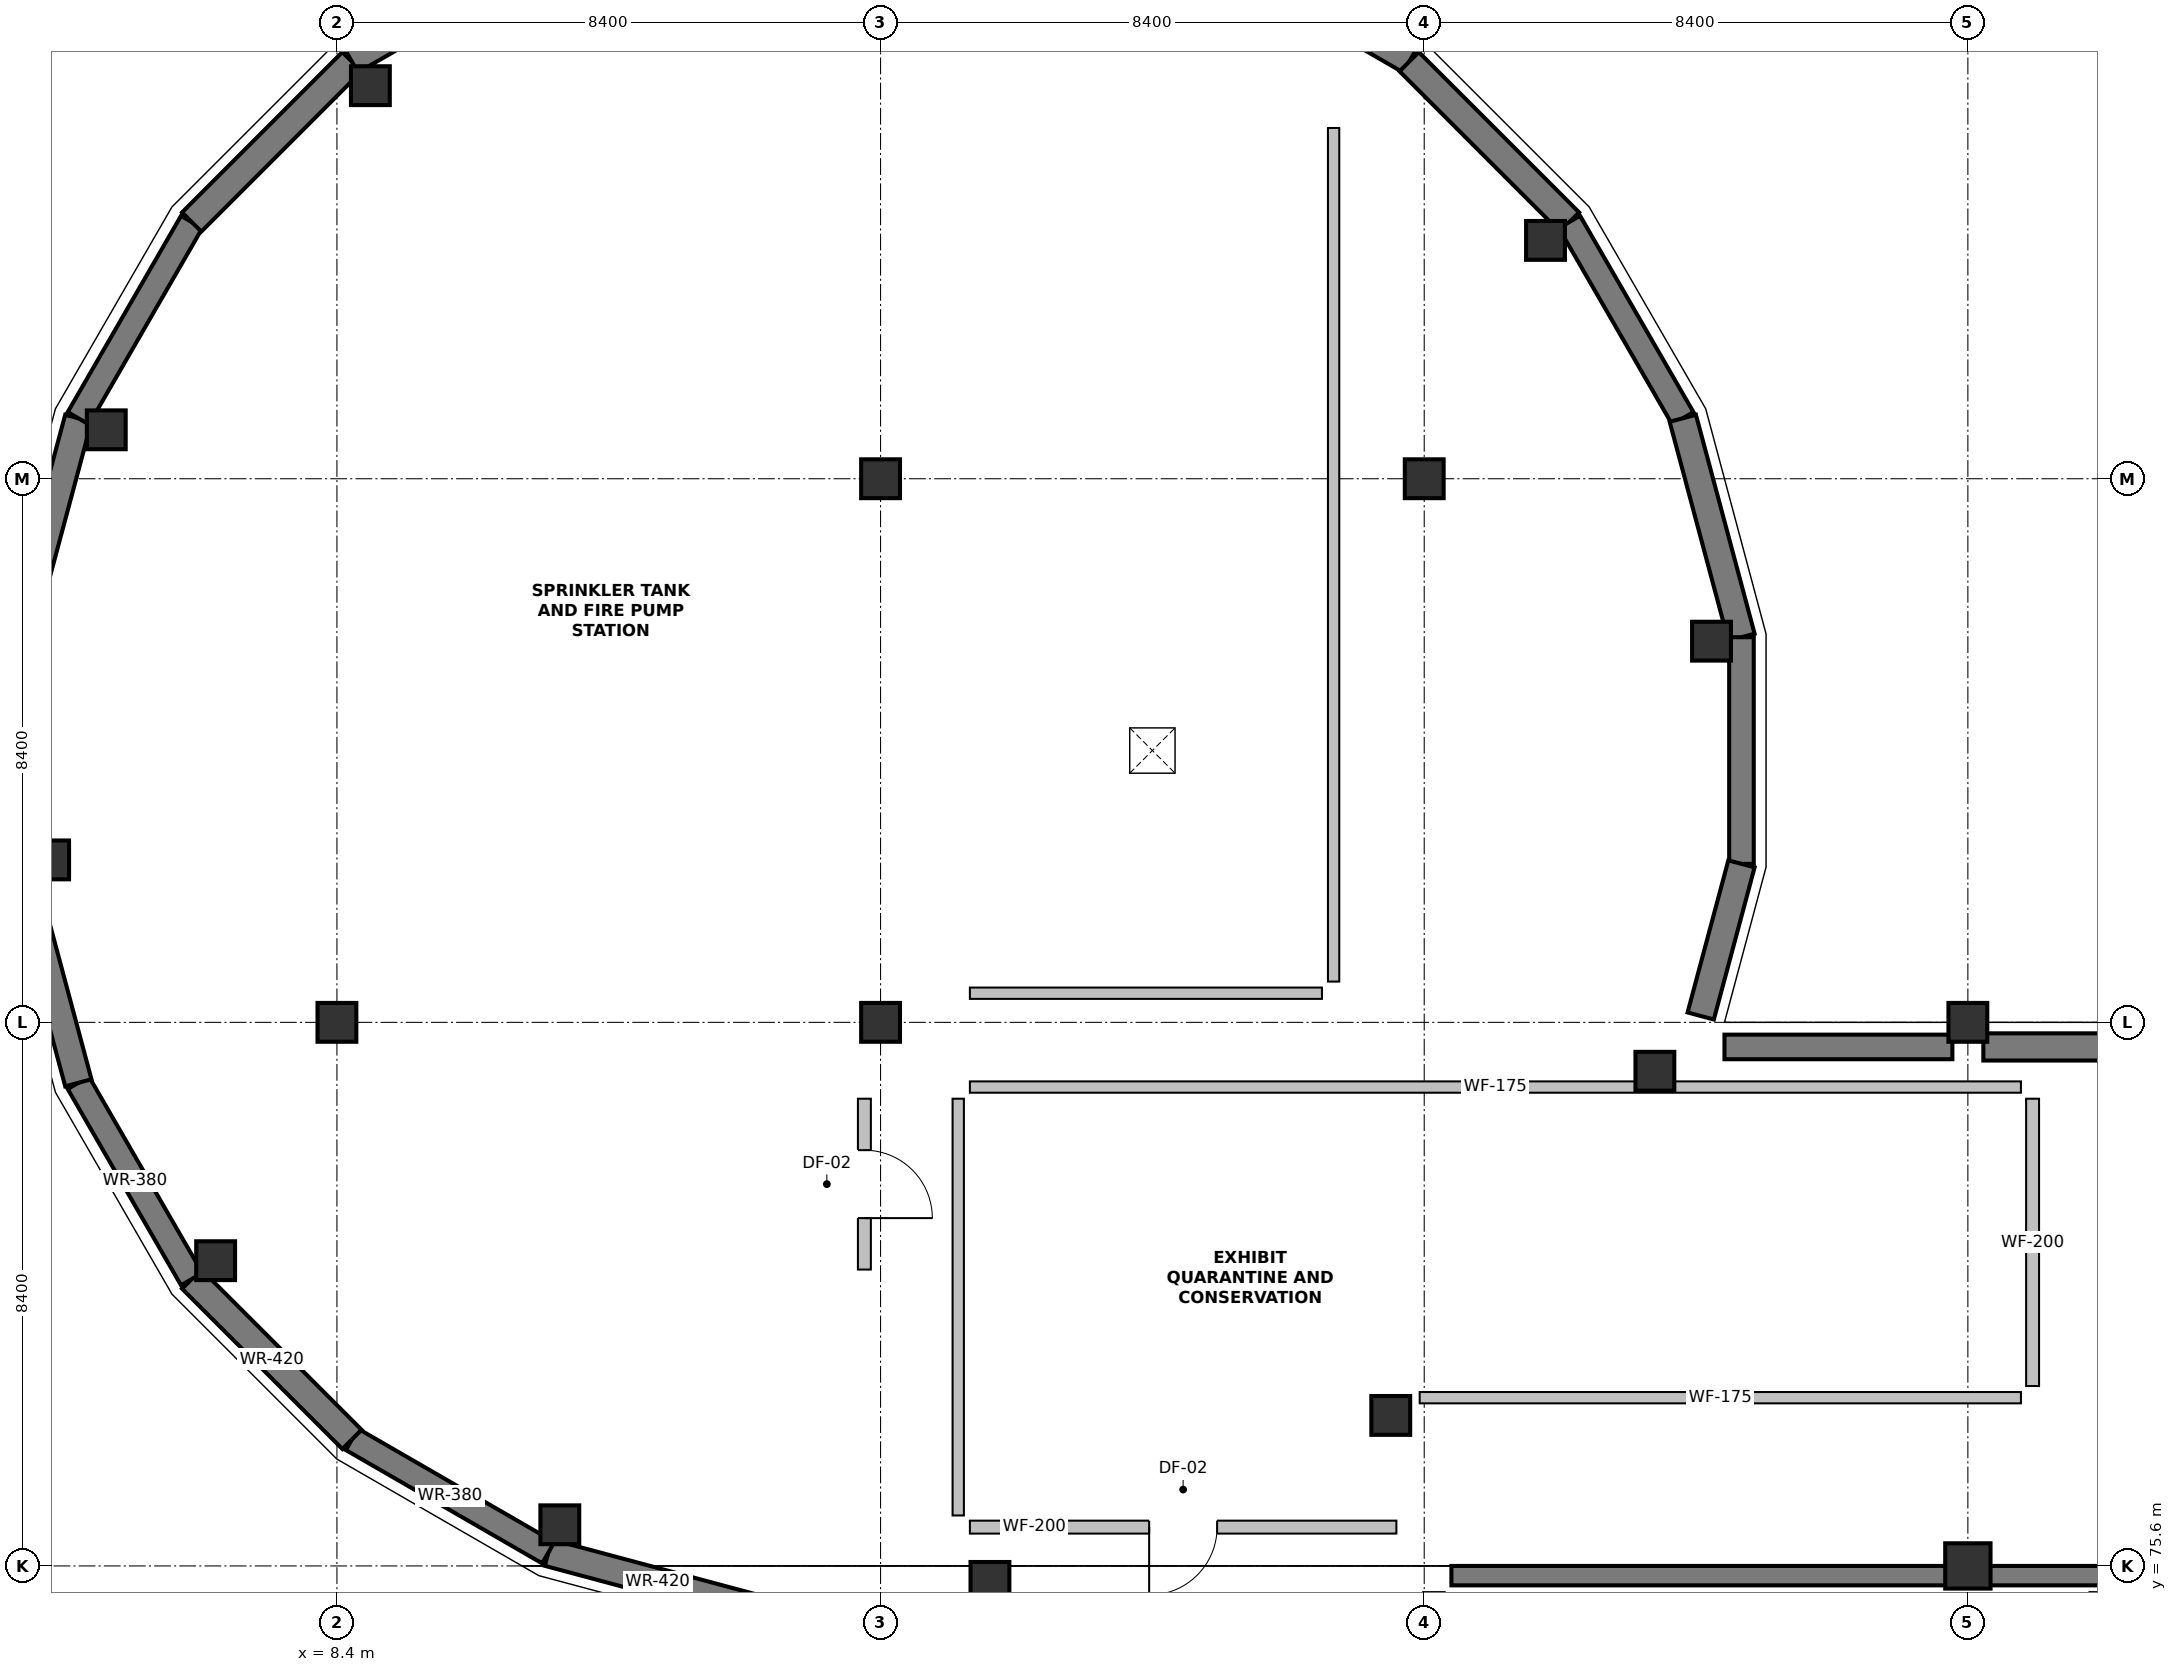
"""IFC4 building model, lengths in metres.
Left out: names, types, materials, properties, quantities, classifications, styles, units other than length and angle.
Written with IfcOpenShell. Run it as: python <this file> out.ifc"""

import sys

from ifc_helpers import new_model, si_unit, direction, frame, frame_2d, origin, origin_2d, place, context, subcontext, project, spatial, rectangle, extrude, element, fill, save


model = new_model("IFC4")
c1 = context("Model", 3, precision=1e-05, world=origin(), true_north=direction((0.0, 1.0)))
c2 = subcontext(c1, "Body", "Model", "MODEL_VIEW")
j1 = project(units=[si_unit("LENGTHUNIT", "METRE"), si_unit("PLANEANGLEUNIT", "RADIAN")], contexts=[c1])
p1 = place(None, origin())
s1 = spatial("IfcSite", under=j1, at=p1, CompositionType="ELEMENT")
p2 = place(p1, origin())
s2 = spatial("IfcBuilding", under=s1, at=p2, CompositionType="ELEMENT")
p3 = place(p2, frame((0.0, 0.0, -4.8)))
s3 = spatial("IfcBuildingStorey", under=s2, at=p3, CompositionType="ELEMENT", Elevation=-4.8)
for number, where, z_axis, x_axis in (
    (1, (29.639, 89.89, 0.0), (0.0, 0.0, 1.0), (1.0, 0.0, 0.0)),
    (2, (27.074, 96.083, 0.0), (0.0, 0.0, 1.0), (1.0, 0.0, 0.0)),
    (3, (8.917, 98.474, 0.0), (0.0, 0.0, 1.0), (1.0, 0.0, 0.0)),
    (4, (4.836, 93.156, 0.0), (0.0, 0.0, 1.0), (1.0, 0.0, 0.0)),
    (5, (3.961, 86.51, 0.0), (0.0, 0.0, 1.0), (1.0, 0.0, 0.0)),
    (6, (6.526, 80.317, 0.0), (0.0, 0.0, 1.0), (1.0, 0.0, 0.0)),
    (7, (11.844, 76.236, 0.0), (0.0, 0.0, 1.0), (1.0, 0.0, 0.0)),
    (8, (18.49, 75.361, 0.0), (0.0, 0.0, 1.0), (1.0, 0.0, 0.0)),
    (9, (24.683, 77.926, 0.0), (0.0, 0.0, 1.0), (1.0, 0.0, 0.0)),
    (10, (28.764, 83.244, 0.0), (0.0, 0.0, 1.0), (1.0, 0.0, 0.0)),
    (11, (8.4, 84.0, 0.0), (0.0, 0.0, 1.0), (1.0, 0.0, 0.0)),
    (12, (16.8, 84.0, 0.0), (0.0, 0.0, 1.0), (1.0, 0.0, 0.0)),
    (13, (16.8, 92.4, 0.0), (0.0, 0.0, 1.0), (1.0, 0.0, 0.0)),
    (14, (25.2, 92.4, 0.0), (0.0, 0.0, 1.0), (1.0, 0.0, 0.0)),
):
    element("IfcColumn", number, at=place(p3, frame(where, z_axis=z_axis, x_axis=x_axis)), inside=s3, PredefinedType="COLUMN", context=c2, shape_type="SweptSolid", body=[
        extrude(rectangle(XDim=0.6, YDim=0.6, at=origin_2d()), origin(), (0.0, 0.0, 1.0), 4.8),
    ])
p4 = place(p3, frame((33.6, 75.6, 0.0), z_axis=(0.0, 0.0, 1.0), x_axis=(1.0, 0.0, 0.0)))
e15 = element("IfcColumn", 15, at=p4, inside=s3, PredefinedType="COLUMN", context=c2, shape_type="SweptSolid", body=[
    extrude(rectangle(XDim=0.7, YDim=0.7, at=origin_2d()), origin(), (0.0, 0.0, 1.0), 4.8),
])
p5 = place(p3, frame((33.6, 84.0, 0.0), z_axis=(0.0, 0.0, 1.0), x_axis=(1.0, 0.0, 0.0)))
e16 = element("IfcColumn", 16, at=p5, inside=s3, PredefinedType="COLUMN", context=c2, shape_type="SweptSolid", body=[
    extrude(rectangle(XDim=0.6, YDim=0.6, at=origin_2d()), origin(), (0.0, 0.0, 1.0), 4.8),
])
p6 = place(p3, frame((15.049, 74.898, 0.0), z_axis=(0.0, 0.0, 1.0), x_axis=(-0.965920667636, 0.25883829669, 0.0)))
e17 = element("IfcWall", 17, at=p6, inside=s3, PredefinedType="USERDEFINED", context=c2, shape_type="SweptSolid", body=[
    extrude(rectangle(XDim=3.502, YDim=0.42, at=frame_2d((1.751, 0.0))), origin(), (0.0, 0.0, 1.0), 4.5),
])
p7 = place(p3, frame((11.666, 75.805, 0.0), z_axis=(0.0, 0.0, 1.0), x_axis=(-0.866042820954, 0.499969831364, 0.0)))
e18 = element("IfcWall", 18, at=p7, inside=s3, PredefinedType="USERDEFINED", context=c2, shape_type="SweptSolid", body=[
    extrude(rectangle(XDim=3.503, YDim=0.38, at=frame_2d((1.751, 0.0))), origin(), (0.0, 0.0, 1.0), 4.5),
])
p8 = place(p3, frame((8.632, 77.556, 0.0), z_axis=(0.0, 0.0, 1.0), x_axis=(-0.707106781187, 0.707106781187, 0.0)))
e19 = element("IfcWall", 19, at=p8, inside=s3, PredefinedType="USERDEFINED", context=c2, shape_type="SweptSolid", body=[
    extrude(rectangle(XDim=3.502, YDim=0.42, at=frame_2d((1.751, 0.0))), origin(), (0.0, 0.0, 1.0), 4.5),
])
p9 = place(p3, frame((6.156, 80.032, 0.0), z_axis=(0.0, 0.0, 1.0), x_axis=(-0.500000013362, 0.86602539607, 0.0)))
e20 = element("IfcWall", 20, at=p9, inside=s3, PredefinedType="USERDEFINED", context=c2, shape_type="SweptSolid", body=[
    extrude(rectangle(XDim=3.502, YDim=0.38, at=frame_2d((1.751, 0.0))), origin(), (0.0, 0.0, 1.0), 4.5),
])
p10 = place(p3, frame((4.405, 83.066, 0.0), z_axis=(0.0, 0.0, 1.0), x_axis=(-0.258820868777, 0.965925337635, 0.0)))
e21 = element("IfcWall", 21, at=p10, inside=s3, PredefinedType="USERDEFINED", context=c2, shape_type="SweptSolid", body=[
    extrude(rectangle(XDim=3.502, YDim=0.42, at=frame_2d((1.751, 0.0))), origin(), (0.0, 0.0, 1.0), 3.85),
])
p11 = place(p3, frame((3.498, 89.951, 0.0), z_axis=(0.0, 0.0, 1.0), x_axis=(0.25883829669, 0.965920667636, 0.0)))
e22 = element("IfcWall", 22, at=p11, inside=s3, PredefinedType="USERDEFINED", context=c2, shape_type="SweptSolid", body=[
    extrude(rectangle(XDim=3.502, YDim=0.42, at=frame_2d((1.751, 0.0))), origin(), (0.0, 0.0, 1.0), 4.5),
])
p12 = place(p3, frame((4.405, 93.334, 0.0), z_axis=(0.0, 0.0, 1.0), x_axis=(0.499969831364, 0.866042820954, 0.0)))
e23 = element("IfcWall", 23, at=p12, inside=s3, PredefinedType="USERDEFINED", context=c2, shape_type="SweptSolid", body=[
    extrude(rectangle(XDim=3.503, YDim=0.38, at=frame_2d((1.751, 0.0))), origin(), (0.0, 0.0, 1.0), 4.5),
])
p13 = place(p3, frame((6.156, 96.368, 0.0), z_axis=(0.0, 0.0, 1.0), x_axis=(0.707106781187, 0.707106781187, 0.0)))
e24 = element("IfcWall", 24, at=p13, inside=s3, PredefinedType="USERDEFINED", context=c2, shape_type="SweptSolid", body=[
    extrude(rectangle(XDim=3.502, YDim=0.42, at=frame_2d((1.751, 0.0))), origin(), (0.0, 0.0, 1.0), 4.5),
])
p14 = place(p3, frame((8.632, 98.844, 0.0), z_axis=(0.0, 0.0, 1.0), x_axis=(0.866042820954, 0.499969831364, 0.0)))
e25 = element("IfcWall", 25, at=p14, inside=s3, PredefinedType="USERDEFINED", context=c2, shape_type="SweptSolid", body=[
    extrude(rectangle(XDim=3.503, YDim=0.38, at=frame_2d((1.751, 0.0))), origin(), (0.0, 0.0, 1.0), 4.5),
])
p15 = place(p3, frame((21.934, 100.595, 0.0), z_axis=(0.0, 0.0, 1.0), x_axis=(0.86602539607, -0.500000013362, 0.0)))
e26 = element("IfcWall", 26, at=p15, inside=s3, PredefinedType="USERDEFINED", context=c2, shape_type="SweptSolid", body=[
    extrude(rectangle(XDim=3.502, YDim=0.38, at=frame_2d((1.751, 0.0))), origin(), (0.0, 0.0, 1.0), 4.5),
])
p16 = place(p3, frame((24.968, 98.844, 0.0), z_axis=(0.0, 0.0, 1.0), x_axis=(0.707106781187, -0.707106781187, 0.0)))
e27 = element("IfcWall", 27, at=p16, inside=s3, PredefinedType="USERDEFINED", context=c2, shape_type="SweptSolid", body=[
    extrude(rectangle(XDim=3.502, YDim=0.42, at=frame_2d((1.751, 0.0))), origin(), (0.0, 0.0, 1.0), 3.85),
])
p17 = place(p3, frame((27.444, 96.368, 0.0), z_axis=(0.0, 0.0, 1.0), x_axis=(0.499969831364, -0.866042820954, 0.0)))
e28 = element("IfcWall", 28, at=p17, inside=s3, PredefinedType="USERDEFINED", context=c2, shape_type="SweptSolid", body=[
    extrude(rectangle(XDim=3.503, YDim=0.38, at=frame_2d((1.751, 0.0))), origin(), (0.0, 0.0, 1.0), 3.85),
])
p18 = place(p3, frame((29.195, 93.334, 0.0), z_axis=(0.0, 0.0, 1.0), x_axis=(0.25883829669, -0.965920667636, 0.0)))
e29 = element("IfcWall", 29, at=p18, inside=s3, PredefinedType="USERDEFINED", context=c2, shape_type="SweptSolid", body=[
    extrude(rectangle(XDim=3.502, YDim=0.42, at=frame_2d((1.751, 0.0))), origin(), (0.0, 0.0, 1.0), 4.5),
])
p19 = place(p3, frame((30.102, 89.951, 0.0), z_axis=(0.0, 0.0, 1.0), x_axis=(0.0, -1.0, 0.0)))
e30 = element("IfcWall", 30, at=p19, inside=s3, PredefinedType="USERDEFINED", context=c2, shape_type="SweptSolid", body=[
    extrude(rectangle(XDim=3.503, YDim=0.38, at=frame_2d((1.751, 0.0))), origin(), (0.0, 0.0, 1.0), 4.5),
])
p20 = place(p3, frame((30.102, 86.449, 0.0), z_axis=(0.0, 0.0, 1.0), x_axis=(-0.258767848858, -0.965939542827, 0.0)))
e31 = element("IfcWall", 31, at=p20, inside=s3, PredefinedType="USERDEFINED", context=c2, shape_type="SweptSolid", body=[
    extrude(rectangle(XDim=2.433, YDim=0.42, at=frame_2d((1.217, 0.0))), origin(), (0.0, 0.0, 1.0), 4.5),
])
p21 = place(p3, frame((29.839, 83.62, 0.0), z_axis=(0.0, 0.0, 1.0), x_axis=(1.0, 0.0, 0.0)))
e32 = element("IfcWall", 32, at=p21, inside=s3, PredefinedType="USERDEFINED", context=c2, shape_type="SweptSolid", body=[
    extrude(rectangle(XDim=3.522, YDim=0.38, at=frame_2d((1.761, 0.0))), origin(), (0.0, 0.0, 1.0), 3.75),
])
p22 = place(p3, frame((33.839, 83.62, 0.0), z_axis=(0.0, 0.0, 1.0), x_axis=(1.0, 0.0, 0.0)))
e33 = element("IfcWall", 33, at=p22, inside=s3, PredefinedType="USERDEFINED", context=c2, shape_type="SweptSolid", body=[
    extrude(rectangle(XDim=7.781, YDim=0.42, at=frame_2d((3.891, 0.0))), origin(), (0.0, 0.0, 1.0), 3.75),
])
p23 = place(p3, frame((25.62, 75.45, 0.0), z_axis=(0.0, 0.0, 1.0), x_axis=(1.0, 0.0, 0.0)))
e34 = element("IfcWall", 34, at=p23, inside=s3, PredefinedType="SHEAR", context=c2, shape_type="SweptSolid", body=[
    extrude(rectangle(XDim=15.96, YDim=0.3, at=frame_2d((7.98, 0.0))), origin(), (0.0, 0.0, 1.0), 4.5),
])
p24 = place(p3, frame((18.18, 83.0, 0.0), z_axis=(0.0, 0.0, 1.0), x_axis=(1.0, 0.0, 0.0)))
e35 = element("IfcWall", 35, at=p24, inside=s3, PredefinedType="PARTITIONING", context=c2, shape_type="SweptSolid", body=[
    extrude(rectangle(XDim=16.24, YDim=0.175, at=frame_2d((8.12, 0.0))), origin(), (0.0, 0.0, 1.0), 4.5),
])
p25 = place(p3, frame((34.6, 82.82, 0.0), z_axis=(0.0, 0.0, 1.0), x_axis=(0.0, -1.0, 0.0)))
e36 = element("IfcWall", 36, at=p25, inside=s3, PredefinedType="PARTITIONING", context=c2, shape_type="SweptSolid", body=[
    extrude(rectangle(XDim=4.44, YDim=0.2, at=frame_2d((2.22, 0.0))), origin(), (0.0, 0.0, 1.0), 4.5),
])
p26 = place(p3, frame((34.42, 78.2, 0.0), z_axis=(0.0, 0.0, 1.0), x_axis=(-1.0, 0.0, 0.0)))
e37 = element("IfcWall", 37, at=p26, inside=s3, PredefinedType="PARTITIONING", context=c2, shape_type="SweptSolid", body=[
    extrude(rectangle(XDim=9.29, YDim=0.175, at=frame_2d((4.645, 0.0))), origin(), (0.0, 0.0, 1.0), 4.5),
])
p27 = place(p3, frame((24.77, 76.2, 0.0), z_axis=(0.0, 0.0, 1.0), x_axis=(-1.0, 0.0, 0.0)))
e38 = element("IfcWall", 38, at=p27, inside=s3, PredefinedType="PARTITIONING", context=c2, shape_type="SweptSolid", body=[
    extrude(rectangle(XDim=6.59, YDim=0.2, at=frame_2d((3.295, 0.0))), origin(), (0.0, 0.0, 1.0), 3.75),
])
p28 = place(p27, frame((2.77, 0.0, 0.0)))
e39 = element("IfcOpeningElement", 39, at=p28, cuts=e38, PredefinedType="OPENING", context=c2, shape_type="SweptSolid", body=[
    extrude(rectangle(XDim=1.05, YDim=2.15, at=frame_2d((0.525, 1.075))), frame((0.0, 0.112, 0.0), z_axis=(0.0, -1.0, 0.0), x_axis=(1.0, 0.0, 0.0)), (0.0, 0.0, 1.0), 0.224),
])
p29 = place(p3, frame((18.0, 76.38, 0.0), z_axis=(0.0, 0.0, 1.0), x_axis=(0.0, 1.0, 0.0)))
e40 = element("IfcWall", 40, at=p29, inside=s3, PredefinedType="PARTITIONING", context=c2, shape_type="SweptSolid", body=[
    extrude(rectangle(XDim=6.44, YDim=0.175, at=frame_2d((3.22, 0.0))), origin(), (0.0, 0.0, 1.0), 4.5),
])
p30 = place(p3, frame((23.62, 84.45, 0.0), z_axis=(0.0, 0.0, 1.0), x_axis=(-1.0, 0.0, 0.0)))
e41 = element("IfcWall", 41, at=p30, inside=s3, PredefinedType="PARTITIONING", context=c2, shape_type="SweptSolid", body=[
    extrude(rectangle(XDim=5.44, YDim=0.175, at=frame_2d((2.72, 0.0))), origin(), (0.0, 0.0, 1.0), 4.5),
])
p31 = place(p3, frame((16.55, 82.82, 0.0), z_axis=(0.0, 0.0, 1.0), x_axis=(0.0, -1.0, 0.0)))
e42 = element("IfcWall", 42, at=p31, inside=s3, PredefinedType="PARTITIONING", context=c2, shape_type="SweptSolid", body=[
    extrude(rectangle(XDim=2.64, YDim=0.2, at=frame_2d((1.32, 0.0))), origin(), (0.0, 0.0, 1.0), 4.5),
])
p32 = place(p31, frame((0.795, 0.0, 0.0)))
e43 = element("IfcOpeningElement", 43, at=p32, cuts=e42, PredefinedType="OPENING", context=c2, shape_type="SweptSolid", body=[
    extrude(rectangle(XDim=1.05, YDim=2.15, at=frame_2d((0.525, 1.075))), frame((0.0, 0.112, 0.0), z_axis=(0.0, -1.0, 0.0), x_axis=(1.0, 0.0, 0.0)), (0.0, 0.0, 1.0), 0.224),
])
p33 = place(p3, frame((23.8, 97.82, 0.0), z_axis=(0.0, 0.0, 1.0), x_axis=(0.0, -1.0, 0.0)))
e44 = element("IfcWall", 44, at=p33, inside=s3, PredefinedType="PARTITIONING", context=c2, shape_type="SweptSolid", body=[
    extrude(rectangle(XDim=13.19, YDim=0.175, at=frame_2d((6.595, 0.0))), origin(), (0.0, 0.0, 1.0), 4.5),
])
p34 = place(p28, origin())
e45 = element("IfcDoor", 45, at=p34, inside=s3, OperationType="SINGLE_SWING_RIGHT", PredefinedType="DOOR", context=c2, shape_type="SweptSolid", body=[
    extrude(rectangle(XDim=1.05, YDim=2.15, at=frame_2d((0.525, 1.075))), frame((0.0, 0.025, 0.0), z_axis=(0.0, -1.0, 0.0), x_axis=(1.0, 0.0, 0.0)), (0.0, 0.0, 1.0), 0.05),
])
fill(e39, e45)
p35 = place(p32, origin())
e46 = element("IfcDoor", 46, at=p35, inside=s3, OperationType="SINGLE_SWING_RIGHT", PredefinedType="DOOR", context=c2, shape_type="SweptSolid", body=[
    extrude(rectangle(XDim=1.05, YDim=2.15, at=frame_2d((0.525, 1.075))), frame((0.0, 0.025, 0.0), z_axis=(0.0, -1.0, 0.0), x_axis=(1.0, 0.0, 0.0)), (0.0, 0.0, 1.0), 0.05),
])
fill(e43, e46)
save(model, sys.argv[1])
